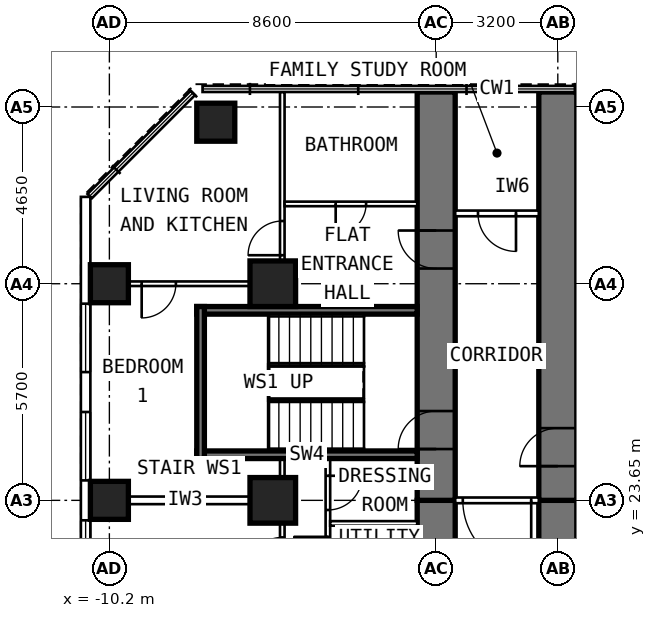
"""IFC4 building model, lengths in metres.
Left out: names, types, materials, properties, quantities, classifications, styles, units other than length and angle.
Written with IfcOpenShell. Run it as: python <this file> out.ifc"""

import sys

from ifc_helpers import new_model, si_unit, direction, frame, frame_2d, origin, origin_2d, place, context, subcontext, project, spatial, rectangle, extrude, element, fill, save


model = new_model("IFC4")
c1 = context("Model", 3, precision=1e-05, world=origin(), true_north=direction((0.0, 1.0)))
c2 = subcontext(c1, "Body", "Model", "MODEL_VIEW")
j1 = project(units=[si_unit("LENGTHUNIT", "METRE"), si_unit("PLANEANGLEUNIT", "RADIAN")], contexts=[c1])
p1 = place(None, origin())
s1 = spatial("IfcSite", under=j1, at=p1, CompositionType="ELEMENT")
p2 = place(p1, origin())
s2 = spatial("IfcBuilding", under=s1, at=p2, CompositionType="ELEMENT")
p3 = place(p2, frame((0.0, 0.0, 46.6)))
s3 = spatial("IfcBuildingStorey", under=s2, at=p3, CompositionType="ELEMENT", Elevation=46.6)
for number, where, z_axis, x_axis in (
    (1, (-10.2, 23.65, 0.0), (0.0, 0.0, 1.0), (0.0, 1.0, 0.0)),
    (2, (-10.2, 29.35, 0.0), (0.0, 0.0, 1.0), (0.0, 1.0, 0.0)),
    (3, (-7.4, 33.6, 0.0), (0.0, 0.0, 1.0), (0.0, 1.0, 0.0)),
):
    element("IfcColumn", number, at=place(p3, frame(where, z_axis=z_axis, x_axis=x_axis)), inside=s3, PredefinedType="COLUMN", context=c2, shape_type="SweptSolid", body=[
        extrude(rectangle(XDim=1.0, YDim=1.0, at=origin_2d()), origin(), (0.0, 0.0, 1.0), 3.6),
    ])
for number, where, z_axis, x_axis in (
    (4, (-5.9, 23.65, 0.0), (0.0, 0.0, 1.0), (0.0, 1.0, 0.0)),
    (5, (-5.9, 29.35, 0.0), (0.0, 0.0, 1.0), (0.0, 1.0, 0.0)),
):
    element("IfcColumn", number, at=place(p3, frame(where, z_axis=z_axis, x_axis=x_axis)), inside=s3, PredefinedType="COLUMN", context=c2, shape_type="SweptSolid", body=[
        extrude(rectangle(XDim=1.2, YDim=1.2, at=origin_2d()), origin(), (0.0, 0.0, 1.0), 3.6),
    ])
p4 = place(p3, frame((-1.6, 17.95, 0.0), z_axis=(0.0, 0.0, 1.0), x_axis=(0.0, 1.0, 0.0)))
e6 = element("IfcWall", 6, at=p4, inside=s3, PredefinedType="SHEAR", context=c2, shape_type="SweptSolid", body=[
    extrude(rectangle(XDim=5.7, YDim=1.0, at=frame_2d((2.85, 0.0))), origin(), (0.0, 0.0, 1.0), 3.6),
])
p5 = place(p3, frame((-1.6, 23.65, 0.0), z_axis=(0.0, 0.0, 1.0), x_axis=(0.0, 1.0, 0.0)))
e7 = element("IfcWall", 7, at=p5, inside=s3, PredefinedType="SHEAR", context=c2, shape_type="SweptSolid", body=[
    extrude(rectangle(XDim=10.745, YDim=1.0, at=frame_2d((5.373, 0.0))), origin(), (0.0, 0.0, 1.0), 3.6),
])
p6 = place(p5, frame((6.1, 0.0, 0.0)))
e8 = element("IfcOpeningElement", 8, at=p6, cuts=e7, PredefinedType="OPENING", context=c2, shape_type="SweptSolid", body=[
    extrude(rectangle(XDim=1.0, YDim=2.1, at=frame_2d((0.5, 1.05))), frame((0.0, 0.512, 0.0), z_axis=(0.0, -1.0, 0.0), x_axis=(1.0, 0.0, 0.0)), (0.0, 0.0, 1.0), 1.024),
])
p7 = place(p5, frame((1.35, 0.0, 0.0)))
e9 = element("IfcOpeningElement", 9, at=p7, cuts=e7, PredefinedType="OPENING", context=c2, shape_type="SweptSolid", body=[
    extrude(rectangle(XDim=1.0, YDim=2.1, at=frame_2d((0.5, 1.05))), frame((0.0, 0.512, 0.0), z_axis=(0.0, -1.0, 0.0), x_axis=(1.0, 0.0, 0.0)), (0.0, 0.0, 1.0), 1.024),
])
p8 = place(p3, frame((1.6, 17.95, 0.0), z_axis=(0.0, 0.0, 1.0), x_axis=(0.0, 1.0, 0.0)))
e10 = element("IfcWall", 10, at=p8, inside=s3, PredefinedType="SHEAR", context=c2, shape_type="SweptSolid", body=[
    extrude(rectangle(XDim=5.7, YDim=1.0, at=frame_2d((2.85, 0.0))), origin(), (0.0, 0.0, 1.0), 3.6),
])
p9 = place(p3, frame((1.6, 23.65, 0.0), z_axis=(0.0, 0.0, 1.0), x_axis=(0.0, 1.0, 0.0)))
e11 = element("IfcWall", 11, at=p9, inside=s3, PredefinedType="SHEAR", context=c2, shape_type="SweptSolid", body=[
    extrude(rectangle(XDim=10.745, YDim=1.0, at=frame_2d((5.373, 0.0))), origin(), (0.0, 0.0, 1.0), 3.6),
])
p10 = place(p9, frame((0.9, 0.0, 0.0)))
e12 = element("IfcOpeningElement", 12, at=p10, cuts=e11, PredefinedType="OPENING", context=c2, shape_type="SweptSolid", body=[
    extrude(rectangle(XDim=1.0, YDim=2.1, at=frame_2d((0.5, 1.05))), frame((0.0, 0.512, 0.0), z_axis=(0.0, -1.0, 0.0), x_axis=(1.0, 0.0, 0.0)), (0.0, 0.0, 1.0), 1.024),
])
p11 = place(p3, frame((-10.825, 6.148, 0.0), z_axis=(0.0, 0.0, 1.0), x_axis=(0.0, 1.0, 0.0)))
e13 = element("IfcWall", 13, at=p11, inside=s3, PredefinedType="SOLIDWALL", context=c2, shape_type="SweptSolid", body=[
    extrude(rectangle(XDim=25.487, YDim=0.25, at=frame_2d((12.744, 0.0))), origin(), (0.0, 0.0, 1.0), 3.35),
])
p12 = place(p11, frame((0.927, 0.0, 0.8)))
e14 = element("IfcOpeningElement", 14, at=p12, cuts=e13, PredefinedType="OPENING", context=c2, shape_type="SweptSolid", body=[
    extrude(rectangle(XDim=1.8, YDim=1.8, at=frame_2d((0.9, 0.9))), frame((0.0, 0.137, 0.0), z_axis=(0.0, -1.0, 0.0), x_axis=(1.0, 0.0, 0.0)), (0.0, 0.0, 1.0), 0.274),
])
p13 = place(p11, frame((3.777, 0.0, 0.8)))
e15 = element("IfcOpeningElement", 15, at=p13, cuts=e13, PredefinedType="OPENING", context=c2, shape_type="SweptSolid", body=[
    extrude(rectangle(XDim=1.8, YDim=1.8, at=frame_2d((0.9, 0.9))), frame((0.0, 0.137, 0.0), z_axis=(0.0, -1.0, 0.0), x_axis=(1.0, 0.0, 0.0)), (0.0, 0.0, 1.0), 0.274),
])
p14 = place(p11, frame((6.627, 0.0, 0.8)))
e16 = element("IfcOpeningElement", 16, at=p14, cuts=e13, PredefinedType="OPENING", context=c2, shape_type="SweptSolid", body=[
    extrude(rectangle(XDim=1.8, YDim=1.8, at=frame_2d((0.9, 0.9))), frame((0.0, 0.137, 0.0), z_axis=(0.0, -1.0, 0.0), x_axis=(1.0, 0.0, 0.0)), (0.0, 0.0, 1.0), 0.274),
])
p15 = place(p11, frame((9.477, 0.0, 0.8)))
e17 = element("IfcOpeningElement", 17, at=p15, cuts=e13, PredefinedType="OPENING", context=c2, shape_type="SweptSolid", body=[
    extrude(rectangle(XDim=1.8, YDim=1.8, at=frame_2d((0.9, 0.9))), frame((0.0, 0.137, 0.0), z_axis=(0.0, -1.0, 0.0), x_axis=(1.0, 0.0, 0.0)), (0.0, 0.0, 1.0), 0.274),
])
p16 = place(p11, frame((12.327, 0.0, 0.8)))
e18 = element("IfcOpeningElement", 18, at=p16, cuts=e13, PredefinedType="OPENING", context=c2, shape_type="SweptSolid", body=[
    extrude(rectangle(XDim=1.8, YDim=1.8, at=frame_2d((0.9, 0.9))), frame((0.0, 0.137, 0.0), z_axis=(0.0, -1.0, 0.0), x_axis=(1.0, 0.0, 0.0)), (0.0, 0.0, 1.0), 0.274),
])
p17 = place(p11, frame((15.177, 0.0, 0.8)))
e19 = element("IfcOpeningElement", 19, at=p17, cuts=e13, PredefinedType="OPENING", context=c2, shape_type="SweptSolid", body=[
    extrude(rectangle(XDim=1.8, YDim=1.8, at=frame_2d((0.9, 0.9))), frame((0.0, 0.137, 0.0), z_axis=(0.0, -1.0, 0.0), x_axis=(1.0, 0.0, 0.0)), (0.0, 0.0, 1.0), 0.274),
])
p18 = place(p11, frame((18.027, 0.0, 0.8)))
e20 = element("IfcOpeningElement", 20, at=p18, cuts=e13, PredefinedType="OPENING", context=c2, shape_type="SweptSolid", body=[
    extrude(rectangle(XDim=1.8, YDim=1.8, at=frame_2d((0.9, 0.9))), frame((0.0, 0.137, 0.0), z_axis=(0.0, -1.0, 0.0), x_axis=(1.0, 0.0, 0.0)), (0.0, 0.0, 1.0), 0.274),
])
p19 = place(p11, frame((20.877, 0.0, 0.8)))
e21 = element("IfcOpeningElement", 21, at=p19, cuts=e13, PredefinedType="OPENING", context=c2, shape_type="SweptSolid", body=[
    extrude(rectangle(XDim=1.8, YDim=1.8, at=frame_2d((0.9, 0.9))), frame((0.0, 0.137, 0.0), z_axis=(0.0, -1.0, 0.0), x_axis=(1.0, 0.0, 0.0)), (0.0, 0.0, 1.0), 0.274),
])
p20 = place(p3, frame((-4.45, 10.1, 0.0), z_axis=(0.0, 0.0, 1.0), x_axis=(0.0, 1.0, 0.0)))
e22 = element("IfcWall", 22, at=p20, inside=s3, PredefinedType="PARTITIONING", context=c2, shape_type="SweptSolid", body=[
    extrude(rectangle(XDim=14.65, YDim=0.12, at=frame_2d((7.325, 0.0))), origin(), (0.0, 0.0, 1.0), 3.35),
])
p21 = place(p20, frame((0.75, 0.0, 0.0)))
e23 = element("IfcOpeningElement", 23, at=p21, cuts=e22, PredefinedType="OPENING", context=c2, shape_type="SweptSolid", body=[
    extrude(rectangle(XDim=0.9, YDim=2.1, at=frame_2d((0.45, 1.05))), frame((0.0, 0.072, 0.0), z_axis=(0.0, -1.0, 0.0), x_axis=(1.0, 0.0, 0.0)), (0.0, 0.0, 1.0), 0.144),
])
p22 = place(p20, frame((3.305, 0.0, 0.0)))
e24 = element("IfcOpeningElement", 24, at=p22, cuts=e22, PredefinedType="OPENING", context=c2, shape_type="SweptSolid", body=[
    extrude(rectangle(XDim=0.8, YDim=2.1, at=frame_2d((0.4, 1.05))), frame((0.0, 0.072, 0.0), z_axis=(0.0, -1.0, 0.0), x_axis=(1.0, 0.0, 0.0)), (0.0, 0.0, 1.0), 0.144),
])
p23 = place(p20, frame((5.313, 0.0, 0.0)))
e25 = element("IfcOpeningElement", 25, at=p23, cuts=e22, PredefinedType="OPENING", context=c2, shape_type="SweptSolid", body=[
    extrude(rectangle(XDim=0.8, YDim=2.1, at=frame_2d((0.4, 1.05))), frame((0.0, 0.072, 0.0), z_axis=(0.0, -1.0, 0.0), x_axis=(1.0, 0.0, 0.0)), (0.0, 0.0, 1.0), 0.144),
])
p24 = place(p20, frame((6.87, 0.0, 0.0)))
e26 = element("IfcOpeningElement", 26, at=p24, cuts=e22, PredefinedType="OPENING", context=c2, shape_type="SweptSolid", body=[
    extrude(rectangle(XDim=0.9, YDim=2.1, at=frame_2d((0.45, 1.05))), frame((0.0, 0.072, 0.0), z_axis=(0.0, -1.0, 0.0), x_axis=(1.0, 0.0, 0.0)), (0.0, 0.0, 1.0), 0.144),
])
p25 = place(p20, frame((8.527, 0.0, 0.0)))
e27 = element("IfcOpeningElement", 27, at=p25, cuts=e22, PredefinedType="OPENING", context=c2, shape_type="SweptSolid", body=[
    extrude(rectangle(XDim=0.8, YDim=2.1, at=frame_2d((0.4, 1.05))), frame((0.0, 0.072, 0.0), z_axis=(0.0, -1.0, 0.0), x_axis=(1.0, 0.0, 0.0)), (0.0, 0.0, 1.0), 0.144),
])
p26 = place(p20, frame((10.133, 0.0, 0.0)))
e28 = element("IfcOpeningElement", 28, at=p26, cuts=e22, PredefinedType="OPENING", context=c2, shape_type="SweptSolid", body=[
    extrude(rectangle(XDim=0.8, YDim=2.1, at=frame_2d((0.4, 1.05))), frame((0.0, 0.072, 0.0), z_axis=(0.0, -1.0, 0.0), x_axis=(1.0, 0.0, 0.0)), (0.0, 0.0, 1.0), 0.144),
])
p27 = place(p20, frame((11.69, 0.0, 0.0)))
e29 = element("IfcOpeningElement", 29, at=p27, cuts=e22, PredefinedType="OPENING", context=c2, shape_type="SweptSolid", body=[
    extrude(rectangle(XDim=0.9, YDim=2.1, at=frame_2d((0.45, 1.05))), frame((0.0, 0.072, 0.0), z_axis=(0.0, -1.0, 0.0), x_axis=(1.0, 0.0, 0.0)), (0.0, 0.0, 1.0), 0.144),
])
p28 = place(p20, frame((13.297, 0.0, 0.0)))
e30 = element("IfcOpeningElement", 30, at=p28, cuts=e22, PredefinedType="OPENING", context=c2, shape_type="SweptSolid", body=[
    extrude(rectangle(XDim=0.9, YDim=2.1, at=frame_2d((0.45, 1.05))), frame((0.0, 0.072, 0.0), z_axis=(0.0, -1.0, 0.0), x_axis=(1.0, 0.0, 0.0)), (0.0, 0.0, 1.0), 0.144),
])
p29 = place(p3, frame((-5.65, 9.6, 0.0), z_axis=(0.0, 0.0, 1.0), x_axis=(0.0, 1.0, 0.0)))
e31 = element("IfcWall", 31, at=p29, inside=s3, PredefinedType="PARTITIONING", context=c2, shape_type="SweptSolid", body=[
    extrude(rectangle(XDim=15.15, YDim=0.12, at=frame_2d((7.575, 0.0))), origin(), (0.0, 0.0, 1.0), 3.35),
])
p30 = place(p29, frame((1.0, 0.0, 0.0)))
e32 = element("IfcOpeningElement", 32, at=p30, cuts=e31, PredefinedType="OPENING", context=c2, shape_type="SweptSolid", body=[
    extrude(rectangle(XDim=0.9, YDim=2.1, at=frame_2d((0.45, 1.05))), frame((0.0, 0.072, 0.0), z_axis=(0.0, -1.0, 0.0), x_axis=(1.0, 0.0, 0.0)), (0.0, 0.0, 1.0), 0.144),
])
p31 = place(p29, frame((3.625, 0.0, 0.0)))
e33 = element("IfcOpeningElement", 33, at=p31, cuts=e31, PredefinedType="OPENING", context=c2, shape_type="SweptSolid", body=[
    extrude(rectangle(XDim=0.9, YDim=2.1, at=frame_2d((0.45, 1.05))), frame((0.0, 0.072, 0.0), z_axis=(0.0, -1.0, 0.0), x_axis=(1.0, 0.0, 0.0)), (0.0, 0.0, 1.0), 0.144),
])
p32 = place(p29, frame((6.475, 0.0, 0.0)))
e34 = element("IfcOpeningElement", 34, at=p32, cuts=e31, PredefinedType="OPENING", context=c2, shape_type="SweptSolid", body=[
    extrude(rectangle(XDim=0.9, YDim=2.1, at=frame_2d((0.45, 1.05))), frame((0.0, 0.072, 0.0), z_axis=(0.0, -1.0, 0.0), x_axis=(1.0, 0.0, 0.0)), (0.0, 0.0, 1.0), 0.144),
])
p33 = place(p29, frame((9.325, 0.0, 0.0)))
e35 = element("IfcOpeningElement", 35, at=p33, cuts=e31, PredefinedType="OPENING", context=c2, shape_type="SweptSolid", body=[
    extrude(rectangle(XDim=0.9, YDim=2.1, at=frame_2d((0.45, 1.05))), frame((0.0, 0.072, 0.0), z_axis=(0.0, -1.0, 0.0), x_axis=(1.0, 0.0, 0.0)), (0.0, 0.0, 1.0), 0.144),
])
p34 = place(p29, frame((12.175, 0.0, 0.0)))
e36 = element("IfcOpeningElement", 36, at=p34, cuts=e31, PredefinedType="OPENING", context=c2, shape_type="SweptSolid", body=[
    extrude(rectangle(XDim=0.9, YDim=2.1, at=frame_2d((0.45, 1.05))), frame((0.0, 0.072, 0.0), z_axis=(0.0, -1.0, 0.0), x_axis=(1.0, 0.0, 0.0)), (0.0, 0.0, 1.0), 0.144),
])
p35 = place(p3, frame((-2.1, 23.043, 0.0), z_axis=(0.0, 0.0, 1.0), x_axis=(-1.0, 0.0, 0.0)))
e37 = element("IfcWall", 37, at=p35, inside=s3, PredefinedType="PARTITIONING", context=c2, shape_type="SweptSolid", body=[
    extrude(rectangle(XDim=2.29, YDim=0.12, at=frame_2d((1.145, 0.0))), origin(), (0.0, 0.0, 1.0), 3.35),
])
p36 = place(p3, frame((-5.71, 23.65, 0.0), z_axis=(0.0, 0.0, 1.0), x_axis=(-1.0, 0.0, 0.0)))
e38 = element("IfcWall", 38, at=p36, inside=s3, PredefinedType="PARTITIONING", context=c2, shape_type="SweptSolid", body=[
    extrude(rectangle(XDim=4.99, YDim=0.2, at=frame_2d((2.495, 0.0))), origin(), (0.0, 0.0, 1.0), 2.45),
])
p37 = place(p3, frame((-5.71, 29.35, 0.0), z_axis=(0.0, 0.0, 1.0), x_axis=(-1.0, 0.0, 0.0)))
e39 = element("IfcWall", 39, at=p37, inside=s3, PredefinedType="PARTITIONING", context=c2, shape_type="SweptSolid", body=[
    extrude(rectangle(XDim=4.99, YDim=0.12, at=frame_2d((2.495, 0.0))), origin(), (0.0, 0.0, 1.0), 2.45),
])
p38 = place(p37, frame((2.74, 0.0, 0.0)))
e40 = element("IfcOpeningElement", 40, at=p38, cuts=e39, PredefinedType="OPENING", context=c2, shape_type="SweptSolid", body=[
    extrude(rectangle(XDim=0.9, YDim=2.1, at=frame_2d((0.45, 1.05))), frame((0.0, 0.072, 0.0), z_axis=(0.0, -1.0, 0.0), x_axis=(1.0, 0.0, 0.0)), (0.0, 0.0, 1.0), 0.144),
])
p39 = place(p3, frame((-5.65, 28.95, 0.0), z_axis=(0.0, 0.0, 1.0), x_axis=(0.0, 1.0, 0.0)))
e41 = element("IfcWall", 41, at=p39, inside=s3, PredefinedType="PARTITIONING", context=c2, shape_type="SweptSolid", body=[
    extrude(rectangle(XDim=5.445, YDim=0.12, at=frame_2d((2.723, 0.0))), origin(), (0.0, 0.0, 1.0), 3.35),
])
p40 = place(p39, frame((1.15, 0.0, 0.0)))
e42 = element("IfcOpeningElement", 42, at=p40, cuts=e41, PredefinedType="OPENING", context=c2, shape_type="SweptSolid", body=[
    extrude(rectangle(XDim=0.9, YDim=2.1, at=frame_2d((0.45, 1.05))), frame((0.0, 0.072, 0.0), z_axis=(0.0, -1.0, 0.0), x_axis=(1.0, 0.0, 0.0)), (0.0, 0.0, 1.0), 0.144),
])
p41 = place(p3, frame((-2.1, 31.45, 0.0), z_axis=(0.0, 0.0, 1.0), x_axis=(-1.0, 0.0, 0.0)))
e43 = element("IfcWall", 43, at=p41, inside=s3, PredefinedType="PARTITIONING", context=c2, shape_type="SweptSolid", body=[
    extrude(rectangle(XDim=3.49, YDim=0.12, at=frame_2d((1.745, 0.0))), origin(), (0.0, 0.0, 1.0), 3.35),
])
p42 = place(p41, frame((1.345, 0.0, 0.0)))
e44 = element("IfcOpeningElement", 44, at=p42, cuts=e43, PredefinedType="OPENING", context=c2, shape_type="SweptSolid", body=[
    extrude(rectangle(XDim=0.8, YDim=2.1, at=frame_2d((0.4, 1.05))), frame((0.0, 0.072, 0.0), z_axis=(0.0, -1.0, 0.0), x_axis=(1.0, 0.0, 0.0)), (0.0, 0.0, 1.0), 0.144),
])
p43 = place(p3, frame((1.1, 31.2, 0.0), z_axis=(0.0, 0.0, 1.0), x_axis=(-1.0, 0.0, 0.0)))
e45 = element("IfcWall", 45, at=p43, inside=s3, PredefinedType="PARTITIONING", context=c2, shape_type="SweptSolid", body=[
    extrude(rectangle(XDim=2.2, YDim=0.15, at=frame_2d((1.1, 0.0))), origin(), (0.0, 0.0, 1.0), 3.35),
])
p44 = place(p43, frame((0.6, 0.0, 0.0)))
e46 = element("IfcOpeningElement", 46, at=p44, cuts=e45, PredefinedType="OPENING", context=c2, shape_type="SweptSolid", body=[
    extrude(rectangle(XDim=1.0, YDim=2.1, at=frame_2d((0.5, 1.05))), frame((0.0, 0.087, 0.0), z_axis=(0.0, -1.0, 0.0), x_axis=(1.0, 0.0, 0.0)), (0.0, 0.0, 1.0), 0.174),
])
p45 = place(p3, frame((1.1, 23.65, 0.0), z_axis=(0.0, 0.0, 1.0), x_axis=(-1.0, 0.0, 0.0)))
e47 = element("IfcWall", 47, at=p45, inside=s3, PredefinedType="PARTITIONING", context=c2, shape_type="SweptSolid", body=[
    extrude(rectangle(XDim=2.2, YDim=0.15, at=frame_2d((1.1, 0.0))), origin(), (0.0, 0.0, 1.0), 3.35),
])
p46 = place(p45, frame((0.2, 0.0, 0.0)))
e48 = element("IfcOpeningElement", 48, at=p46, cuts=e47, PredefinedType="OPENING", context=c2, shape_type="SweptSolid", body=[
    extrude(rectangle(XDim=1.8, YDim=2.1, at=frame_2d((0.9, 1.05))), frame((0.0, 0.087, 0.0), z_axis=(0.0, -1.0, 0.0), x_axis=(1.0, 0.0, 0.0)), (0.0, 0.0, 1.0), 0.174),
])
for number, where, z_axis, x_axis in (
    (49, (-2.1, 24.85, 0.0), (0.0, 0.0, 1.0), (-1.0, 0.0, 0.0)),
    (50, (-2.1, 28.65, 0.0), (0.0, 0.0, 1.0), (-1.0, 0.0, 0.0)),
):
    element("IfcWall", number, at=place(p3, frame(where, z_axis=z_axis, x_axis=x_axis)), inside=s3, PredefinedType="SHEAR", context=c2, shape_type="SweptSolid", body=[
        extrude(rectangle(XDim=5.8, YDim=0.2, at=frame_2d((2.9, 0.0))), origin(), (0.0, 0.0, 1.0), 3.33),
    ])
p47 = place(p3, frame((-7.8, 24.75, 0.0), z_axis=(0.0, 0.0, 1.0), x_axis=(0.0, 1.0, 0.0)))
e51 = element("IfcWall", 51, at=p47, inside=s3, PredefinedType="SHEAR", context=c2, shape_type="SweptSolid", body=[
    extrude(rectangle(XDim=4.0, YDim=0.2, at=frame_2d((2.0, 0.0))), origin(), (0.0, 0.0, 1.0), 3.33),
])
p48 = place(p17, origin())
e52 = element("IfcWindow", 52, at=p48, inside=s3, PartitioningType="SINGLE_PANEL", PredefinedType="WINDOW", context=c2, shape_type="SweptSolid", body=[
    extrude(rectangle(XDim=1.8, YDim=1.8, at=frame_2d((0.9, 0.9))), frame((0.0, 0.03, 0.0), z_axis=(0.0, -1.0, 0.0), x_axis=(1.0, 0.0, 0.0)), (0.0, 0.0, 1.0), 0.06),
])
fill(e19, e52)
p49 = place(p18, origin())
e53 = element("IfcWindow", 53, at=p49, inside=s3, PartitioningType="SINGLE_PANEL", PredefinedType="WINDOW", context=c2, shape_type="SweptSolid", body=[
    extrude(rectangle(XDim=1.8, YDim=1.8, at=frame_2d((0.9, 0.9))), frame((0.0, 0.03, 0.0), z_axis=(0.0, -1.0, 0.0), x_axis=(1.0, 0.0, 0.0)), (0.0, 0.0, 1.0), 0.06),
])
fill(e20, e53)
p50 = place(p19, origin())
e54 = element("IfcWindow", 54, at=p50, inside=s3, PartitioningType="SINGLE_PANEL", PredefinedType="WINDOW", context=c2, shape_type="SweptSolid", body=[
    extrude(rectangle(XDim=1.8, YDim=1.8, at=frame_2d((0.9, 0.9))), frame((0.0, 0.03, 0.0), z_axis=(0.0, -1.0, 0.0), x_axis=(1.0, 0.0, 0.0)), (0.0, 0.0, 1.0), 0.06),
])
fill(e21, e54)
p51 = place(p34, origin())
e55 = element("IfcDoor", 55, at=p51, inside=s3, OperationType="SINGLE_SWING_LEFT", PredefinedType="DOOR", context=c2, shape_type="SweptSolid", body=[
    extrude(rectangle(XDim=0.9, YDim=2.1, at=frame_2d((0.45, 1.05))), frame((0.0, 0.025, 0.0), z_axis=(0.0, -1.0, 0.0), x_axis=(1.0, 0.0, 0.0)), (0.0, 0.0, 1.0), 0.05),
])
fill(e36, e55)
p52 = place(p27, origin())
e56 = element("IfcDoor", 56, at=p52, inside=s3, OperationType="SINGLE_SWING_RIGHT", PredefinedType="DOOR", context=c2, shape_type="SweptSolid", body=[
    extrude(rectangle(XDim=0.9, YDim=2.1, at=frame_2d((0.45, 1.05))), frame((0.0, 0.025, 0.0), z_axis=(0.0, -1.0, 0.0), x_axis=(1.0, 0.0, 0.0)), (0.0, 0.0, 1.0), 0.05),
])
fill(e29, e56)
p53 = place(p28, frame((0.9, 0.0, 0.0), z_axis=(0.0, 0.0, 1.0), x_axis=(-1.0, 0.0, 0.0)))
e57 = element("IfcDoor", 57, at=p53, inside=s3, OperationType="SINGLE_SWING_LEFT", PredefinedType="DOOR", context=c2, shape_type="SweptSolid", body=[
    extrude(rectangle(XDim=0.9, YDim=2.1, at=frame_2d((0.45, 1.05))), frame((0.0, 0.025, 0.0), z_axis=(0.0, -1.0, 0.0), x_axis=(1.0, 0.0, 0.0)), (0.0, 0.0, 1.0), 0.05),
])
fill(e30, e57)
p54 = place(p38, origin())
e58 = element("IfcDoor", 58, at=p54, inside=s3, OperationType="SINGLE_SWING_RIGHT", PredefinedType="DOOR", context=c2, shape_type="SweptSolid", body=[
    extrude(rectangle(XDim=0.9, YDim=2.1, at=frame_2d((0.45, 1.05))), frame((0.0, 0.025, 0.0), z_axis=(0.0, -1.0, 0.0), x_axis=(1.0, 0.0, 0.0)), (0.0, 0.0, 1.0), 0.05),
])
fill(e40, e58)
p55 = place(p40, origin())
e59 = element("IfcDoor", 59, at=p55, inside=s3, OperationType="SINGLE_SWING_LEFT", PredefinedType="DOOR", context=c2, shape_type="SweptSolid", body=[
    extrude(rectangle(XDim=0.9, YDim=2.1, at=frame_2d((0.45, 1.05))), frame((0.0, 0.025, 0.0), z_axis=(0.0, -1.0, 0.0), x_axis=(1.0, 0.0, 0.0)), (0.0, 0.0, 1.0), 0.05),
])
fill(e42, e59)
p56 = place(p42, origin())
e60 = element("IfcDoor", 60, at=p56, inside=s3, OperationType="SINGLE_SWING_RIGHT", PredefinedType="DOOR", context=c2, shape_type="SweptSolid", body=[
    extrude(rectangle(XDim=0.8, YDim=2.1, at=frame_2d((0.4, 1.05))), frame((0.0, 0.025, 0.0), z_axis=(0.0, -1.0, 0.0), x_axis=(1.0, 0.0, 0.0)), (0.0, 0.0, 1.0), 0.05),
])
fill(e44, e60)
p57 = place(p6, origin())
e61 = element("IfcDoor", 61, at=p57, inside=s3, OperationType="SINGLE_SWING_RIGHT", PredefinedType="DOOR", context=c2, shape_type="SweptSolid", body=[
    extrude(rectangle(XDim=1.0, YDim=2.1, at=frame_2d((0.5, 1.05))), frame((0.0, 0.25, 0.0), z_axis=(0.0, -1.0, 0.0), x_axis=(1.0, 0.0, 0.0)), (0.0, 0.0, 1.0), 0.5),
])
fill(e8, e61)
p58 = place(p10, origin())
e62 = element("IfcDoor", 62, at=p58, inside=s3, OperationType="SINGLE_SWING_LEFT", PredefinedType="DOOR", context=c2, shape_type="SweptSolid", body=[
    extrude(rectangle(XDim=1.0, YDim=2.1, at=frame_2d((0.5, 1.05))), frame((0.0, 0.25, 0.0), z_axis=(0.0, -1.0, 0.0), x_axis=(1.0, 0.0, 0.0)), (0.0, 0.0, 1.0), 0.5),
])
fill(e12, e62)
p59 = place(p44, origin())
e63 = element("IfcDoor", 63, at=p59, inside=s3, OperationType="SINGLE_SWING_LEFT", PredefinedType="DOOR", context=c2, shape_type="SweptSolid", body=[
    extrude(rectangle(XDim=1.0, YDim=2.1, at=frame_2d((0.5, 1.05))), frame((0.0, 0.025, 0.0), z_axis=(0.0, -1.0, 0.0), x_axis=(1.0, 0.0, 0.0)), (0.0, 0.0, 1.0), 0.05),
])
fill(e46, e63)
p60 = place(p46, origin())
e64 = element("IfcDoor", 64, at=p60, inside=s3, OperationType="DOUBLE_DOOR_DOUBLE_SWING", PredefinedType="DOOR", context=c2, shape_type="SweptSolid", body=[
    extrude(rectangle(XDim=1.8, YDim=2.1, at=frame_2d((0.9, 1.05))), frame((0.0, 0.025, 0.0), z_axis=(0.0, -1.0, 0.0), x_axis=(1.0, 0.0, 0.0)), (0.0, 0.0, 1.0), 0.05),
])
fill(e48, e64)
p61 = place(p7, origin())
e65 = element("IfcDoor", 65, at=p61, inside=s3, OperationType="SINGLE_SWING_LEFT", PredefinedType="DOOR", context=c2, shape_type="SweptSolid", body=[
    extrude(rectangle(XDim=1.0, YDim=2.1, at=frame_2d((0.5, 1.05))), frame((0.0, 0.25, 0.0), z_axis=(0.0, -1.0, 0.0), x_axis=(1.0, 0.0, 0.0)), (0.0, 0.0, 1.0), 0.5),
])
fill(e9, e65)
save(model, sys.argv[1])
